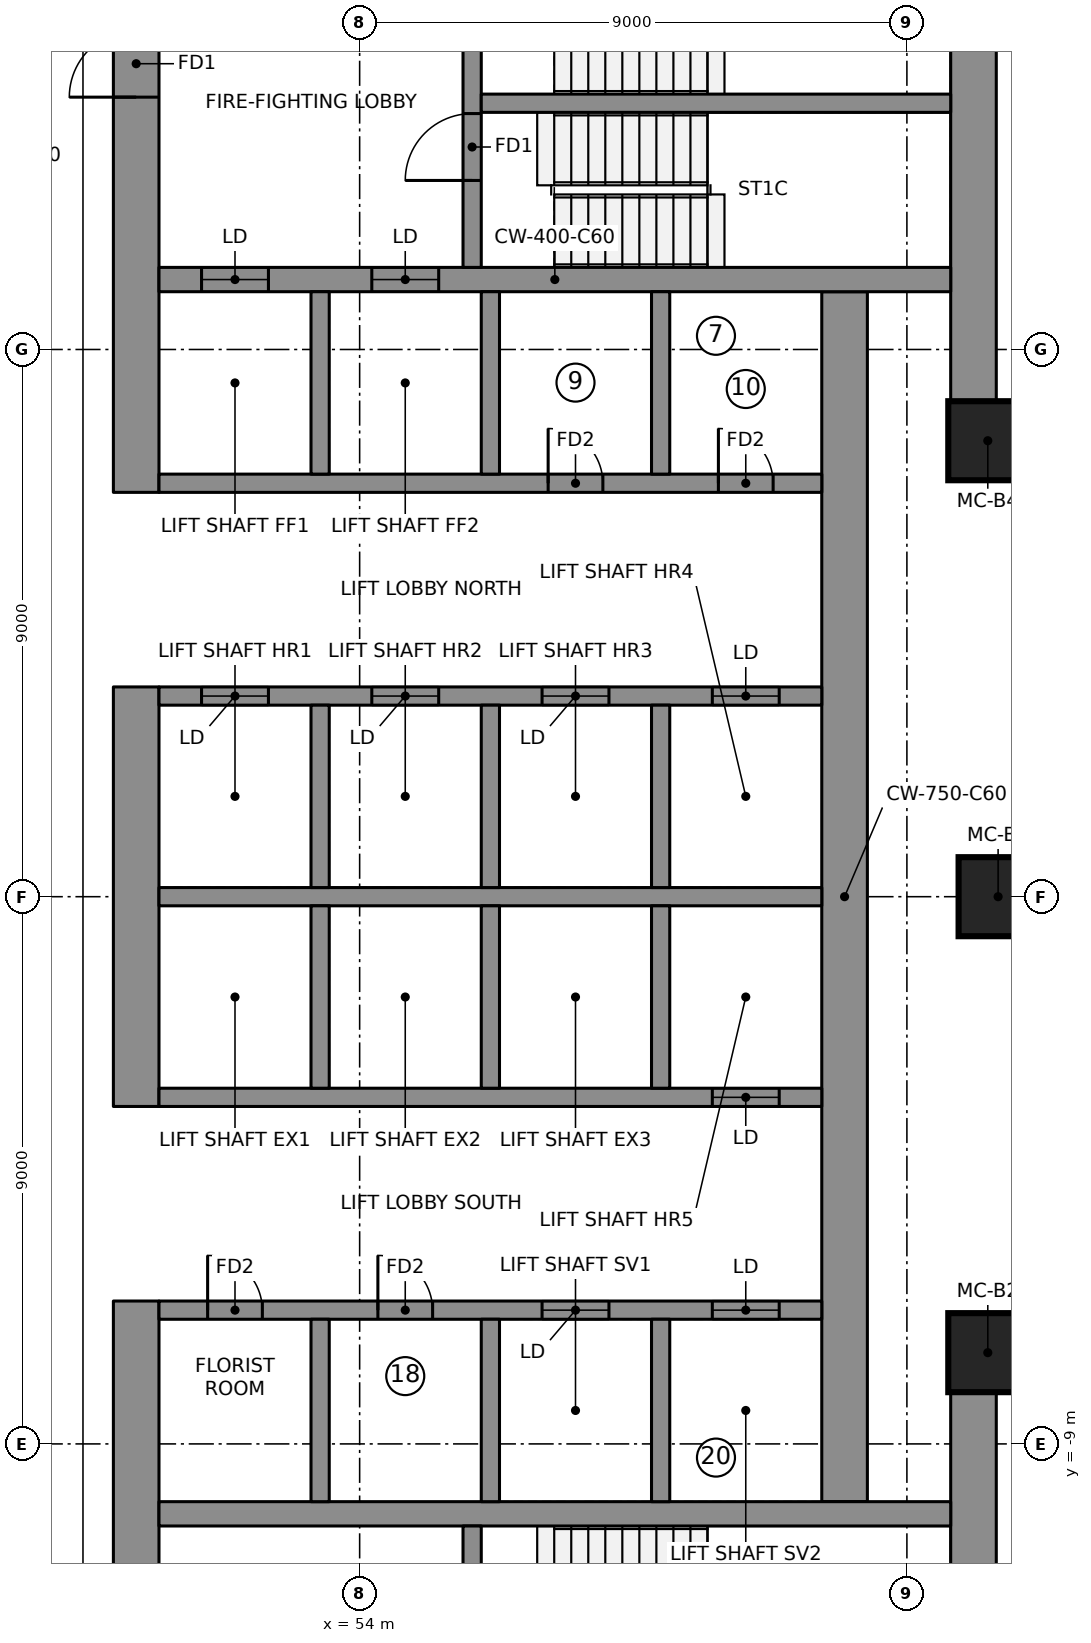
"""IFC4 building model, lengths in metres.
Left out: names, types, materials, properties, quantities, classifications, styles, units other than length and angle.
Written with IfcOpenShell. Run it as: python <this file> out.ifc"""

import sys

from ifc_helpers import new_model, si_unit, direction, frame, frame_2d, origin, origin_2d, place, context, subcontext, project, spatial, rectangle, extrude, element, fill, save


model = new_model("IFC4")
c1 = context("Model", 3, precision=1e-05, world=origin(), true_north=direction((0.0, 1.0)))
c2 = subcontext(c1, "Body", "Model", "MODEL_VIEW")
j1 = project(units=[si_unit("LENGTHUNIT", "METRE"), si_unit("PLANEANGLEUNIT", "RADIAN")], contexts=[c1])
p1 = place(None, origin())
s1 = spatial("IfcSite", under=j1, at=p1, CompositionType="ELEMENT")
p2 = place(p1, origin())
s2 = spatial("IfcBuilding", under=s1, at=p2, CompositionType="ELEMENT")
p3 = place(p2, frame((0.0, 0.0, 179.05)))
s3 = spatial("IfcBuildingStorey", under=s2, at=p3, CompositionType="ELEMENT", Elevation=179.05)
p4 = place(p3, frame((50.325, 6.65, 0.0), z_axis=(0.0, 0.0, 1.0), x_axis=(0.0, 1.0, 0.0)))
e1 = element("IfcWall", 1, at=p4, inside=s3, PredefinedType="SHEAR", context=c2, shape_type="SweptSolid", body=[
    extrude(rectangle(XDim=9.85, YDim=0.75, at=frame_2d((4.925, 0.0))), origin(), (0.0, 0.0, 1.0), 3.55),
])
p5 = place(p4, frame((6.5, 0.0, 0.0)))
e2 = element("IfcOpeningElement", 2, at=p5, cuts=e1, PredefinedType="OPENING", context=c2, shape_type="SweptSolid", body=[
    extrude(rectangle(XDim=1.1, YDim=2.1, at=frame_2d((0.55, 1.05))), frame((0.0, 0.385, 0.0), z_axis=(0.0, -1.0, 0.0), x_axis=(1.0, 0.0, 0.0)), (0.0, 0.0, 1.0), 0.77),
])
p6 = place(p3, frame((50.325, -3.45, 0.0), z_axis=(0.0, 0.0, 1.0), x_axis=(0.0, 1.0, 0.0)))
e3 = element("IfcWall", 3, at=p6, inside=s3, PredefinedType="SHEAR", context=c2, shape_type="SweptSolid", body=[
    extrude(rectangle(XDim=6.9, YDim=0.75, at=frame_2d((3.45, 0.0))), origin(), (0.0, 0.0, 1.0), 3.55),
])
p7 = place(p3, frame((50.325, -16.5, 0.0), z_axis=(0.0, 0.0, 1.0), x_axis=(0.0, 1.0, 0.0)))
e4 = element("IfcWall", 4, at=p7, inside=s3, PredefinedType="SHEAR", context=c2, shape_type="SweptSolid", body=[
    extrude(rectangle(XDim=9.85, YDim=0.75, at=frame_2d((4.925, 0.0))), origin(), (0.0, 0.0, 1.0), 3.55),
])
p8 = place(p7, frame((2.25, 0.0, 0.0)))
e5 = element("IfcOpeningElement", 5, at=p8, cuts=e4, PredefinedType="OPENING", context=c2, shape_type="SweptSolid", body=[
    extrude(rectangle(XDim=1.1, YDim=2.1, at=frame_2d((0.55, 1.05))), frame((0.0, 0.385, 0.0), z_axis=(0.0, -1.0, 0.0), x_axis=(1.0, 0.0, 0.0)), (0.0, 0.0, 1.0), 0.77),
])
for number, where, z_axis, x_axis in (
    (6, (64.095, 8.099, 0.0), (0.0, 0.0, 1.0), (0.0, 1.0, 0.0)),
    (7, (64.095, -15.75, 0.0), (0.0, 0.0, 1.0), (0.0, 1.0, 0.0)),
):
    element("IfcWall", number, at=place(p3, frame(where, z_axis=z_axis, x_axis=x_axis)), inside=s3, PredefinedType="SHEAR", context=c2, shape_type="SweptSolid", body=[
        extrude(rectangle(XDim=7.651, YDim=0.75, at=frame_2d((3.825, 0.0))), origin(), (0.0, 0.0, 1.0), 3.55),
    ])
p9 = place(p3, frame((61.975, -9.95, 0.0), z_axis=(0.0, 0.0, 1.0), x_axis=(0.0, 1.0, 0.0)))
e8 = element("IfcWall", 8, at=p9, inside=s3, PredefinedType="SHEAR", context=c2, shape_type="SweptSolid", body=[
    extrude(rectangle(XDim=19.9, YDim=0.75, at=frame_2d((9.95, 0.0))), origin(), (0.0, 0.0, 1.0), 3.55),
])
p10 = place(p3, frame((50.7, 10.15, 0.0), z_axis=(0.0, 0.0, 1.0), x_axis=(1.0, 0.0, 0.0)))
e9 = element("IfcWall", 9, at=p10, inside=s3, PredefinedType="SHEAR", context=c2, shape_type="SweptSolid", body=[
    extrude(rectangle(XDim=13.02, YDim=0.4, at=frame_2d((6.51, 0.0))), origin(), (0.0, 0.0, 1.0), 3.55),
])
p11 = place(p10, frame((0.7, 0.0, 0.0)))
e10 = element("IfcOpeningElement", 10, at=p11, cuts=e9, PredefinedType="OPENING", context=c2, shape_type="SweptSolid", body=[
    extrude(rectangle(XDim=1.1, YDim=2.1, at=frame_2d((0.55, 1.05))), frame((0.0, 0.21, 0.0), z_axis=(0.0, -1.0, 0.0), x_axis=(1.0, 0.0, 0.0)), (0.0, 0.0, 1.0), 0.42),
])
p12 = place(p10, frame((3.5, 0.0, 0.0)))
e11 = element("IfcOpeningElement", 11, at=p12, cuts=e9, PredefinedType="OPENING", context=c2, shape_type="SweptSolid", body=[
    extrude(rectangle(XDim=1.1, YDim=2.1, at=frame_2d((0.55, 1.05))), frame((0.0, 0.21, 0.0), z_axis=(0.0, -1.0, 0.0), x_axis=(1.0, 0.0, 0.0)), (0.0, 0.0, 1.0), 0.42),
])
p13 = place(p3, frame((50.7, -10.15, 0.0), z_axis=(0.0, 0.0, 1.0), x_axis=(1.0, 0.0, 0.0)))
e12 = element("IfcWall", 12, at=p13, inside=s3, PredefinedType="SHEAR", context=c2, shape_type="SweptSolid", body=[
    extrude(rectangle(XDim=13.02, YDim=0.4, at=frame_2d((6.51, 0.0))), origin(), (0.0, 0.0, 1.0), 3.55),
])
p14 = place(p3, frame((50.7, 0.0, 0.0), z_axis=(0.0, 0.0, 1.0), x_axis=(1.0, 0.0, 0.0)))
e13 = element("IfcWall", 13, at=p14, inside=s3, PredefinedType="SHEAR", context=c2, shape_type="SweptSolid", body=[
    extrude(rectangle(XDim=10.9, YDim=0.3, at=frame_2d((5.45, 0.0))), origin(), (0.0, 0.0, 1.0), 3.55),
])
p15 = place(p3, frame((50.7, 3.3, 0.0), z_axis=(0.0, 0.0, 1.0), x_axis=(1.0, 0.0, 0.0)))
e14 = element("IfcWall", 14, at=p15, inside=s3, PredefinedType="SHEAR", context=c2, shape_type="SweptSolid", body=[
    extrude(rectangle(XDim=10.9, YDim=0.3, at=frame_2d((5.45, 0.0))), origin(), (0.0, 0.0, 1.0), 3.55),
])
p16 = place(p15, frame((0.7, 0.0, 0.0)))
e15 = element("IfcOpeningElement", 15, at=p16, cuts=e14, PredefinedType="OPENING", context=c2, shape_type="SweptSolid", body=[
    extrude(rectangle(XDim=1.1, YDim=2.1, at=frame_2d((0.55, 1.05))), frame((0.0, 0.16, 0.0), z_axis=(0.0, -1.0, 0.0), x_axis=(1.0, 0.0, 0.0)), (0.0, 0.0, 1.0), 0.32),
])
p17 = place(p15, frame((3.5, 0.0, 0.0)))
e16 = element("IfcOpeningElement", 16, at=p17, cuts=e14, PredefinedType="OPENING", context=c2, shape_type="SweptSolid", body=[
    extrude(rectangle(XDim=1.1, YDim=2.1, at=frame_2d((0.55, 1.05))), frame((0.0, 0.16, 0.0), z_axis=(0.0, -1.0, 0.0), x_axis=(1.0, 0.0, 0.0)), (0.0, 0.0, 1.0), 0.32),
])
p18 = place(p15, frame((6.3, 0.0, 0.0)))
e17 = element("IfcOpeningElement", 17, at=p18, cuts=e14, PredefinedType="OPENING", context=c2, shape_type="SweptSolid", body=[
    extrude(rectangle(XDim=1.1, YDim=2.1, at=frame_2d((0.55, 1.05))), frame((0.0, 0.16, 0.0), z_axis=(0.0, -1.0, 0.0), x_axis=(1.0, 0.0, 0.0)), (0.0, 0.0, 1.0), 0.32),
])
p19 = place(p15, frame((9.1, 0.0, 0.0)))
e18 = element("IfcOpeningElement", 18, at=p19, cuts=e14, PredefinedType="OPENING", context=c2, shape_type="SweptSolid", body=[
    extrude(rectangle(XDim=1.1, YDim=2.1, at=frame_2d((0.55, 1.05))), frame((0.0, 0.16, 0.0), z_axis=(0.0, -1.0, 0.0), x_axis=(1.0, 0.0, 0.0)), (0.0, 0.0, 1.0), 0.32),
])
p20 = place(p3, frame((50.7, 6.8, 0.0), z_axis=(0.0, 0.0, 1.0), x_axis=(1.0, 0.0, 0.0)))
e19 = element("IfcWall", 19, at=p20, inside=s3, PredefinedType="SHEAR", context=c2, shape_type="SweptSolid", body=[
    extrude(rectangle(XDim=10.9, YDim=0.3, at=frame_2d((5.45, 0.0))), origin(), (0.0, 0.0, 1.0), 3.55),
])
p21 = place(p20, frame((6.4, 0.0, 0.0)))
e20 = element("IfcOpeningElement", 20, at=p21, cuts=e19, PredefinedType="OPENING", context=c2, shape_type="SweptSolid", body=[
    extrude(rectangle(XDim=0.9, YDim=2.1, at=frame_2d((0.45, 1.05))), frame((0.0, 0.16, 0.0), z_axis=(0.0, -1.0, 0.0), x_axis=(1.0, 0.0, 0.0)), (0.0, 0.0, 1.0), 0.32),
])
p22 = place(p20, frame((9.2, 0.0, 0.0)))
e21 = element("IfcOpeningElement", 21, at=p22, cuts=e19, PredefinedType="OPENING", context=c2, shape_type="SweptSolid", body=[
    extrude(rectangle(XDim=0.9, YDim=2.1, at=frame_2d((0.45, 1.05))), frame((0.0, 0.16, 0.0), z_axis=(0.0, -1.0, 0.0), x_axis=(1.0, 0.0, 0.0)), (0.0, 0.0, 1.0), 0.32),
])
for number, where, z_axis, x_axis in (
    (22, (53.35, 0.15, 0.0), (0.0, 0.0, 1.0), (0.0, 1.0, 0.0)),
    (23, (53.35, 6.95, 0.0), (0.0, 0.0, 1.0), (0.0, 1.0, 0.0)),
    (24, (56.15, 0.15, 0.0), (0.0, 0.0, 1.0), (0.0, 1.0, 0.0)),
    (25, (56.15, 6.95, 0.0), (0.0, 0.0, 1.0), (0.0, 1.0, 0.0)),
    (26, (58.95, 0.15, 0.0), (0.0, 0.0, 1.0), (0.0, 1.0, 0.0)),
    (27, (58.95, 6.95, 0.0), (0.0, 0.0, 1.0), (0.0, 1.0, 0.0)),
):
    element("IfcWall", number, at=place(p3, frame(where, z_axis=z_axis, x_axis=x_axis)), inside=s3, PredefinedType="SHEAR", context=c2, shape_type="SweptSolid", body=[
        extrude(rectangle(XDim=3.0, YDim=0.3, at=frame_2d((1.5, 0.0))), origin(), (0.0, 0.0, 1.0), 3.55),
    ])
p23 = place(p3, frame((50.7, -3.3, 0.0), z_axis=(0.0, 0.0, 1.0), x_axis=(1.0, 0.0, 0.0)))
e28 = element("IfcWall", 28, at=p23, inside=s3, PredefinedType="SHEAR", context=c2, shape_type="SweptSolid", body=[
    extrude(rectangle(XDim=10.9, YDim=0.3, at=frame_2d((5.45, 0.0))), origin(), (0.0, 0.0, 1.0), 3.55),
])
p24 = place(p23, frame((9.1, 0.0, 0.0)))
e29 = element("IfcOpeningElement", 29, at=p24, cuts=e28, PredefinedType="OPENING", context=c2, shape_type="SweptSolid", body=[
    extrude(rectangle(XDim=1.1, YDim=2.1, at=frame_2d((0.55, 1.05))), frame((0.0, 0.16, 0.0), z_axis=(0.0, -1.0, 0.0), x_axis=(1.0, 0.0, 0.0)), (0.0, 0.0, 1.0), 0.32),
])
p25 = place(p3, frame((50.7, -6.8, 0.0), z_axis=(0.0, 0.0, 1.0), x_axis=(1.0, 0.0, 0.0)))
e30 = element("IfcWall", 30, at=p25, inside=s3, PredefinedType="SHEAR", context=c2, shape_type="SweptSolid", body=[
    extrude(rectangle(XDim=10.9, YDim=0.3, at=frame_2d((5.45, 0.0))), origin(), (0.0, 0.0, 1.0), 3.55),
])
p26 = place(p25, frame((6.3, 0.0, 0.0)))
e31 = element("IfcOpeningElement", 31, at=p26, cuts=e30, PredefinedType="OPENING", context=c2, shape_type="SweptSolid", body=[
    extrude(rectangle(XDim=1.1, YDim=2.1, at=frame_2d((0.55, 1.05))), frame((0.0, 0.16, 0.0), z_axis=(0.0, -1.0, 0.0), x_axis=(1.0, 0.0, 0.0)), (0.0, 0.0, 1.0), 0.32),
])
p27 = place(p25, frame((9.1, 0.0, 0.0)))
e32 = element("IfcOpeningElement", 32, at=p27, cuts=e30, PredefinedType="OPENING", context=c2, shape_type="SweptSolid", body=[
    extrude(rectangle(XDim=1.1, YDim=2.1, at=frame_2d((0.55, 1.05))), frame((0.0, 0.16, 0.0), z_axis=(0.0, -1.0, 0.0), x_axis=(1.0, 0.0, 0.0)), (0.0, 0.0, 1.0), 0.32),
])
p28 = place(p25, frame((0.8, 0.0, 0.0)))
e33 = element("IfcOpeningElement", 33, at=p28, cuts=e30, PredefinedType="OPENING", context=c2, shape_type="SweptSolid", body=[
    extrude(rectangle(XDim=0.9, YDim=2.1, at=frame_2d((0.45, 1.05))), frame((0.0, 0.16, 0.0), z_axis=(0.0, -1.0, 0.0), x_axis=(1.0, 0.0, 0.0)), (0.0, 0.0, 1.0), 0.32),
])
p29 = place(p25, frame((3.6, 0.0, 0.0)))
e34 = element("IfcOpeningElement", 34, at=p29, cuts=e30, PredefinedType="OPENING", context=c2, shape_type="SweptSolid", body=[
    extrude(rectangle(XDim=0.9, YDim=2.1, at=frame_2d((0.45, 1.05))), frame((0.0, 0.16, 0.0), z_axis=(0.0, -1.0, 0.0), x_axis=(1.0, 0.0, 0.0)), (0.0, 0.0, 1.0), 0.32),
])
for number, where, z_axis, x_axis in (
    (35, (53.35, -3.15, 0.0), (0.0, 0.0, 1.0), (0.0, 1.0, 0.0)),
    (36, (53.35, -9.95, 0.0), (0.0, 0.0, 1.0), (0.0, 1.0, 0.0)),
    (37, (56.15, -3.15, 0.0), (0.0, 0.0, 1.0), (0.0, 1.0, 0.0)),
    (38, (56.15, -9.95, 0.0), (0.0, 0.0, 1.0), (0.0, 1.0, 0.0)),
    (39, (58.95, -3.15, 0.0), (0.0, 0.0, 1.0), (0.0, 1.0, 0.0)),
    (40, (58.95, -9.95, 0.0), (0.0, 0.0, 1.0), (0.0, 1.0, 0.0)),
):
    element("IfcWall", number, at=place(p3, frame(where, z_axis=z_axis, x_axis=x_axis)), inside=s3, PredefinedType="SHEAR", context=c2, shape_type="SweptSolid", body=[
        extrude(rectangle(XDim=3.0, YDim=0.3, at=frame_2d((1.5, 0.0))), origin(), (0.0, 0.0, 1.0), 3.55),
    ])
p30 = place(p3, frame((55.85, 10.35, 0.0), z_axis=(0.0, 0.0, 1.0), x_axis=(0.0, 1.0, 0.0)))
e41 = element("IfcWall", 41, at=p30, inside=s3, PredefinedType="SHEAR", context=c2, shape_type="SweptSolid", body=[
    extrude(rectangle(XDim=5.4, YDim=0.3, at=frame_2d((2.7, 0.0))), origin(), (0.0, 0.0, 1.0), 3.55),
])
p31 = place(p30, frame((1.43, 0.0, 0.0)))
e42 = element("IfcOpeningElement", 42, at=p31, cuts=e41, PredefinedType="OPENING", context=c2, shape_type="SweptSolid", body=[
    extrude(rectangle(XDim=1.1, YDim=2.1, at=frame_2d((0.55, 1.05))), frame((0.0, 0.16, 0.0), z_axis=(0.0, -1.0, 0.0), x_axis=(1.0, 0.0, 0.0)), (0.0, 0.0, 1.0), 0.32),
])
p32 = place(p30, frame((3.6, 0.0, 0.0)))
e43 = element("IfcOpeningElement", 43, at=p32, cuts=e41, PredefinedType="OPENING", context=c2, shape_type="SweptSolid", body=[
    extrude(rectangle(XDim=1.1, YDim=2.1, at=frame_2d((0.55, 1.05))), frame((0.0, 0.16, 0.0), z_axis=(0.0, -1.0, 0.0), x_axis=(1.0, 0.0, 0.0)), (0.0, 0.0, 1.0), 0.32),
])
p33 = place(p3, frame((55.85, -15.75, 0.0), z_axis=(0.0, 0.0, 1.0), x_axis=(0.0, 1.0, 0.0)))
e44 = element("IfcWall", 44, at=p33, inside=s3, PredefinedType="SHEAR", context=c2, shape_type="SweptSolid", body=[
    extrude(rectangle(XDim=5.4, YDim=0.3, at=frame_2d((2.7, 0.0))), origin(), (0.0, 0.0, 1.0), 3.55),
])
p34 = place(p33, frame((3.6, 0.0, 0.0)))
e45 = element("IfcOpeningElement", 45, at=p34, cuts=e44, PredefinedType="OPENING", context=c2, shape_type="SweptSolid", body=[
    extrude(rectangle(XDim=1.1, YDim=2.1, at=frame_2d((0.55, 1.05))), frame((0.0, 0.16, 0.0), z_axis=(0.0, -1.0, 0.0), x_axis=(1.0, 0.0, 0.0)), (0.0, 0.0, 1.0), 0.32),
])
p35 = place(p33, frame((0.8, 0.0, 0.0)))
e46 = element("IfcOpeningElement", 46, at=p35, cuts=e44, PredefinedType="OPENING", context=c2, shape_type="SweptSolid", body=[
    extrude(rectangle(XDim=0.9, YDim=2.1, at=frame_2d((0.45, 1.05))), frame((0.0, 0.16, 0.0), z_axis=(0.0, -1.0, 0.0), x_axis=(1.0, 0.0, 0.0)), (0.0, 0.0, 1.0), 0.32),
])
p36 = place(p3, frame((56.0, 13.05, 0.0), z_axis=(0.0, 0.0, 1.0), x_axis=(1.0, 0.0, 0.0)))
e47 = element("IfcWall", 47, at=p36, inside=s3, PredefinedType="SHEAR", context=c2, shape_type="SweptSolid", body=[
    extrude(rectangle(XDim=7.72, YDim=0.3, at=frame_2d((3.86, 0.0))), origin(), (0.0, 0.0, 1.0), 3.55),
])
for number, where, z_axis, x_axis in (
    (48, (64.33, -7.499, 0.0), (0.0, 0.0, 1.0), (1.0, 0.0, 0.0)),
    (49, (64.5, 0.0, 0.0), (0.0, 0.0, 1.0), (1.0, 0.0, 0.0)),
    (50, (64.33, 7.499, 0.0), (0.0, 0.0, 1.0), (1.0, 0.0, 0.0)),
):
    element("IfcColumn", number, at=place(p3, frame(where, z_axis=z_axis, x_axis=x_axis)), inside=s3, PredefinedType="COLUMN", context=c2, shape_type="SweptSolid", body=[
        extrude(rectangle(XDim=1.3, YDim=1.3, at=origin_2d()), origin(), (0.0, 0.0, 1.0), 3.55),
    ])
p37 = place(p11, origin())
e51 = element("IfcDoor", 51, at=p37, inside=s3, OperationType="DOUBLE_DOOR_SLIDING", PredefinedType="DOOR", context=c2, shape_type="SweptSolid", body=[
    extrude(rectangle(XDim=1.1, YDim=2.1, at=frame_2d((0.55, 1.05))), frame((0.0, 0.025, 0.0), z_axis=(0.0, -1.0, 0.0), x_axis=(1.0, 0.0, 0.0)), (0.0, 0.0, 1.0), 0.05),
])
fill(e10, e51)
p38 = place(p12, origin())
e52 = element("IfcDoor", 52, at=p38, inside=s3, OperationType="DOUBLE_DOOR_SLIDING", PredefinedType="DOOR", context=c2, shape_type="SweptSolid", body=[
    extrude(rectangle(XDim=1.1, YDim=2.1, at=frame_2d((0.55, 1.05))), frame((0.0, 0.025, 0.0), z_axis=(0.0, -1.0, 0.0), x_axis=(1.0, 0.0, 0.0)), (0.0, 0.0, 1.0), 0.05),
])
fill(e11, e52)
p39 = place(p16, origin())
e53 = element("IfcDoor", 53, at=p39, inside=s3, OperationType="DOUBLE_DOOR_SLIDING", PredefinedType="DOOR", context=c2, shape_type="SweptSolid", body=[
    extrude(rectangle(XDim=1.1, YDim=2.1, at=frame_2d((0.55, 1.05))), frame((0.0, 0.025, 0.0), z_axis=(0.0, -1.0, 0.0), x_axis=(1.0, 0.0, 0.0)), (0.0, 0.0, 1.0), 0.05),
])
fill(e15, e53)
p40 = place(p17, origin())
e54 = element("IfcDoor", 54, at=p40, inside=s3, OperationType="DOUBLE_DOOR_SLIDING", PredefinedType="DOOR", context=c2, shape_type="SweptSolid", body=[
    extrude(rectangle(XDim=1.1, YDim=2.1, at=frame_2d((0.55, 1.05))), frame((0.0, 0.025, 0.0), z_axis=(0.0, -1.0, 0.0), x_axis=(1.0, 0.0, 0.0)), (0.0, 0.0, 1.0), 0.05),
])
fill(e16, e54)
p41 = place(p18, origin())
e55 = element("IfcDoor", 55, at=p41, inside=s3, OperationType="DOUBLE_DOOR_SLIDING", PredefinedType="DOOR", context=c2, shape_type="SweptSolid", body=[
    extrude(rectangle(XDim=1.1, YDim=2.1, at=frame_2d((0.55, 1.05))), frame((0.0, 0.025, 0.0), z_axis=(0.0, -1.0, 0.0), x_axis=(1.0, 0.0, 0.0)), (0.0, 0.0, 1.0), 0.05),
])
fill(e17, e55)
p42 = place(p19, origin())
e56 = element("IfcDoor", 56, at=p42, inside=s3, OperationType="DOUBLE_DOOR_SLIDING", PredefinedType="DOOR", context=c2, shape_type="SweptSolid", body=[
    extrude(rectangle(XDim=1.1, YDim=2.1, at=frame_2d((0.55, 1.05))), frame((0.0, 0.025, 0.0), z_axis=(0.0, -1.0, 0.0), x_axis=(1.0, 0.0, 0.0)), (0.0, 0.0, 1.0), 0.05),
])
fill(e18, e56)
p43 = place(p24, origin())
e57 = element("IfcDoor", 57, at=p43, inside=s3, OperationType="DOUBLE_DOOR_SLIDING", PredefinedType="DOOR", context=c2, shape_type="SweptSolid", body=[
    extrude(rectangle(XDim=1.1, YDim=2.1, at=frame_2d((0.55, 1.05))), frame((0.0, 0.025, 0.0), z_axis=(0.0, -1.0, 0.0), x_axis=(1.0, 0.0, 0.0)), (0.0, 0.0, 1.0), 0.05),
])
fill(e29, e57)
p44 = place(p26, origin())
e58 = element("IfcDoor", 58, at=p44, inside=s3, OperationType="DOUBLE_DOOR_SLIDING", PredefinedType="DOOR", context=c2, shape_type="SweptSolid", body=[
    extrude(rectangle(XDim=1.1, YDim=2.1, at=frame_2d((0.55, 1.05))), frame((0.0, 0.025, 0.0), z_axis=(0.0, -1.0, 0.0), x_axis=(1.0, 0.0, 0.0)), (0.0, 0.0, 1.0), 0.05),
])
fill(e31, e58)
p45 = place(p27, origin())
e59 = element("IfcDoor", 59, at=p45, inside=s3, OperationType="DOUBLE_DOOR_SLIDING", PredefinedType="DOOR", context=c2, shape_type="SweptSolid", body=[
    extrude(rectangle(XDim=1.1, YDim=2.1, at=frame_2d((0.55, 1.05))), frame((0.0, 0.025, 0.0), z_axis=(0.0, -1.0, 0.0), x_axis=(1.0, 0.0, 0.0)), (0.0, 0.0, 1.0), 0.05),
])
fill(e32, e59)
p46 = place(p31, origin())
e60 = element("IfcDoor", 60, at=p46, inside=s3, OperationType="SINGLE_SWING_RIGHT", PredefinedType="DOOR", context=c2, shape_type="SweptSolid", body=[
    extrude(rectangle(XDim=1.1, YDim=2.1, at=frame_2d((0.55, 1.05))), frame((0.0, 0.025, 0.0), z_axis=(0.0, -1.0, 0.0), x_axis=(1.0, 0.0, 0.0)), (0.0, 0.0, 1.0), 0.05),
])
fill(e42, e60)
p47 = place(p5, origin())
e61 = element("IfcDoor", 61, at=p47, inside=s3, OperationType="SINGLE_SWING_RIGHT", PredefinedType="DOOR", context=c2, shape_type="SweptSolid", body=[
    extrude(rectangle(XDim=1.1, YDim=2.1, at=frame_2d((0.55, 1.05))), frame((0.0, 0.025, 0.0), z_axis=(0.0, -1.0, 0.0), x_axis=(1.0, 0.0, 0.0)), (0.0, 0.0, 1.0), 0.05),
])
fill(e2, e61)
p48 = place(p21, origin())
e62 = element("IfcDoor", 62, at=p48, inside=s3, OperationType="SINGLE_SWING_LEFT", PredefinedType="DOOR", context=c2, shape_type="SweptSolid", body=[
    extrude(rectangle(XDim=0.9, YDim=2.1, at=frame_2d((0.45, 1.05))), frame((0.0, 0.025, 0.0), z_axis=(0.0, -1.0, 0.0), x_axis=(1.0, 0.0, 0.0)), (0.0, 0.0, 1.0), 0.05),
])
fill(e20, e62)
p49 = place(p22, origin())
e63 = element("IfcDoor", 63, at=p49, inside=s3, OperationType="SINGLE_SWING_LEFT", PredefinedType="DOOR", context=c2, shape_type="SweptSolid", body=[
    extrude(rectangle(XDim=0.9, YDim=2.1, at=frame_2d((0.45, 1.05))), frame((0.0, 0.025, 0.0), z_axis=(0.0, -1.0, 0.0), x_axis=(1.0, 0.0, 0.0)), (0.0, 0.0, 1.0), 0.05),
])
fill(e21, e63)
p50 = place(p28, origin())
e64 = element("IfcDoor", 64, at=p50, inside=s3, OperationType="SINGLE_SWING_LEFT", PredefinedType="DOOR", context=c2, shape_type="SweptSolid", body=[
    extrude(rectangle(XDim=0.9, YDim=2.1, at=frame_2d((0.45, 1.05))), frame((0.0, 0.025, 0.0), z_axis=(0.0, -1.0, 0.0), x_axis=(1.0, 0.0, 0.0)), (0.0, 0.0, 1.0), 0.05),
])
fill(e33, e64)
p51 = place(p29, origin())
e65 = element("IfcDoor", 65, at=p51, inside=s3, OperationType="SINGLE_SWING_LEFT", PredefinedType="DOOR", context=c2, shape_type="SweptSolid", body=[
    extrude(rectangle(XDim=0.9, YDim=2.1, at=frame_2d((0.45, 1.05))), frame((0.0, 0.025, 0.0), z_axis=(0.0, -1.0, 0.0), x_axis=(1.0, 0.0, 0.0)), (0.0, 0.0, 1.0), 0.05),
])
fill(e34, e65)
save(model, sys.argv[1])
